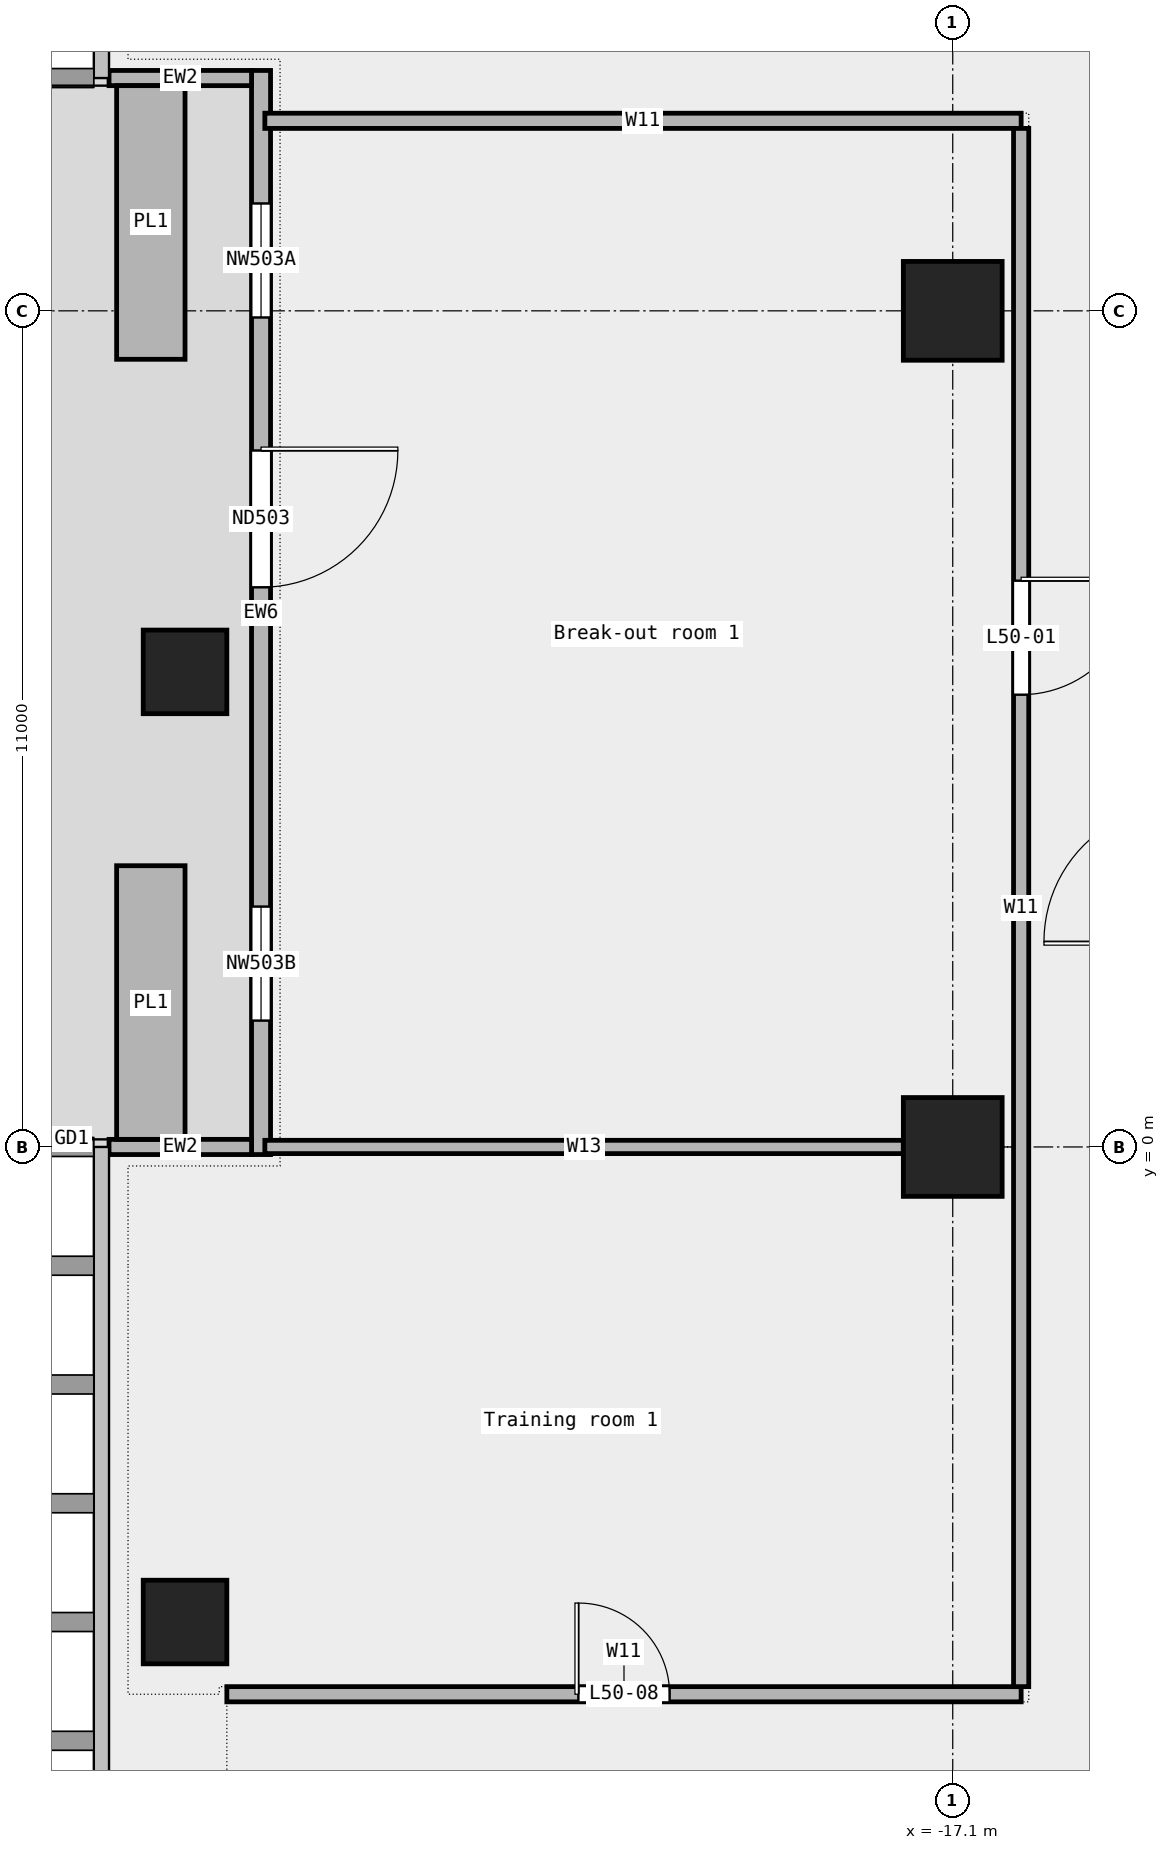
"""IFC4 building model, lengths in metres.
Left out: names, types, materials, properties, quantities, classifications, styles, units other than length and angle.
Written with IfcOpenShell. Run it as: python <this file> out.ifc"""

import sys

from ifc_helpers import new_model, si_unit, direction, frame, frame_2d, origin, origin_2d, place, context, subcontext, project, spatial, rectangle, extrude, element, fill, save


model = new_model("IFC4")
c1 = context("Model", 3, precision=1e-05, world=origin(), true_north=direction((0.0, 1.0)))
c2 = subcontext(c1, "Body", "Model", "MODEL_VIEW")
j1 = project(units=[si_unit("LENGTHUNIT", "METRE"), si_unit("PLANEANGLEUNIT", "RADIAN")], contexts=[c1])
p1 = place(None, origin())
s1 = spatial("IfcSite", under=j1, at=p1, CompositionType="ELEMENT")
p2 = place(p1, origin())
s2 = spatial("IfcBuilding", under=s1, at=p2, CompositionType="ELEMENT")
p3 = place(p2, frame((0.0, 0.0, 235.0)))
s3 = spatial("IfcBuildingStorey", under=s2, at=p3, CompositionType="ELEMENT", Elevation=235.0)
for number, where, z_axis, x_axis in (
    (1, (-27.2, 6.25, 0.0), (0.0, 0.0, 1.0), (1.0, 0.0, 0.0)),
    (2, (-27.2, -6.25, 0.0), (0.0, 0.0, 1.0), (1.0, 0.0, 0.0)),
):
    element("IfcColumn", number, at=place(p3, frame(where, z_axis=z_axis, x_axis=x_axis)), inside=s3, PredefinedType="COLUMN", context=c2, shape_type="SweptSolid", body=[
        extrude(rectangle(XDim=1.1, YDim=1.1, at=origin_2d()), origin(), (0.0, 0.0, 1.0), 3.6),
    ])
for number, where, z_axis, x_axis in (
    (3, (-17.1, 0.0, 0.0), (0.0, 0.0, 1.0), (1.0, 0.0, 0.0)),
    (4, (-17.1, 11.0, 0.0), (0.0, 0.0, 1.0), (1.0, 0.0, 0.0)),
):
    element("IfcColumn", number, at=place(p3, frame(where, z_axis=z_axis, x_axis=x_axis)), inside=s3, PredefinedType="COLUMN", context=c2, shape_type="SweptSolid", body=[
        extrude(rectangle(XDim=1.3, YDim=1.3, at=origin_2d()), origin(), (0.0, 0.0, 1.0), 3.6),
    ])
p4 = place(p3, frame((-26.2, 14.163, 0.0), z_axis=(0.0, 0.0, 1.0), x_axis=(0.0, -1.0, 0.0)))
e5 = element("IfcWall", 5, at=p4, inside=s3, PredefinedType="STANDARD", context=c2, shape_type="SweptSolid", body=[
    extrude(rectangle(XDim=14.263, YDim=0.25, at=frame_2d((7.131, 0.0))), origin(), (0.0, 0.0, 1.0), 3.6),
])
p5 = place(p4, frame((1.75, 0.0, 0.45)))
e6 = element("IfcOpeningElement", 6, at=p5, cuts=e5, PredefinedType="OPENING", context=c2, shape_type="SweptSolid", body=[
    extrude(rectangle(XDim=1.5, YDim=2.4, at=frame_2d((0.75, 1.2))), frame((0.0, 0.137, 0.0), z_axis=(0.0, -1.0, 0.0), x_axis=(1.0, 0.0, 0.0)), (0.0, 0.0, 1.0), 0.274),
])
p6 = place(p4, frame((5.0, 0.0, 0.0)))
e7 = element("IfcOpeningElement", 7, at=p6, cuts=e5, PredefinedType="OPENING", context=c2, shape_type="SweptSolid", body=[
    extrude(rectangle(XDim=1.8, YDim=2.4, at=frame_2d((0.9, 1.2))), frame((0.0, 0.137, 0.0), z_axis=(0.0, -1.0, 0.0), x_axis=(1.0, 0.0, 0.0)), (0.0, 0.0, 1.0), 0.274),
])
p7 = place(p4, frame((11.0, 0.0, 0.45)))
e8 = element("IfcOpeningElement", 8, at=p7, cuts=e5, PredefinedType="OPENING", context=c2, shape_type="SweptSolid", body=[
    extrude(rectangle(XDim=1.5, YDim=2.4, at=frame_2d((0.75, 1.2))), frame((0.0, 0.137, 0.0), z_axis=(0.0, -1.0, 0.0), x_axis=(1.0, 0.0, 0.0)), (0.0, 0.0, 1.0), 0.274),
])
for number, where, z_axis, x_axis in (
    (9, (-28.2, 14.062, 0.0), (0.0, 0.0, 1.0), (1.0, 0.0, 0.0)),
    (10, (-28.2, 0.0, 0.0), (0.0, 0.0, 1.0), (1.0, 0.0, 0.0)),
):
    element("IfcWall", number, at=place(p3, frame(where, z_axis=z_axis, x_axis=x_axis)), inside=s3, PredefinedType="STANDARD", context=c2, shape_type="SweptSolid", body=[
        extrude(rectangle(XDim=1.875, YDim=0.2, at=frame_2d((0.938, 0.0))), origin(), (0.0, 0.0, 1.0), 3.6),
    ])
for number, where, z_axis, x_axis in (
    (11, (-27.65, 13.962, 0.0), (0.0, 0.0, 1.0), (0.0, -1.0, 0.0)),
    (12, (-27.65, 3.7, 0.0), (0.0, 0.0, 1.0), (0.0, -1.0, 0.0)),
):
    element("IfcWall", number, at=place(p3, frame(where, z_axis=z_axis, x_axis=x_axis)), inside=s3, PredefinedType="STANDARD", context=c2, shape_type="SweptSolid", body=[
        extrude(rectangle(XDim=3.6, YDim=0.9, at=frame_2d((1.8, 0.0))), origin(), (0.0, 0.0, 1.0), 0.7),
    ])
p8 = place(p3, frame((-26.65, -7.2, 0.0), z_axis=(0.0, 0.0, 1.0), x_axis=(1.0, 0.0, 0.0)))
e13 = element("IfcWall", 13, at=p8, inside=s3, PredefinedType="PARTITIONING", context=c2, shape_type="SweptSolid", body=[
    extrude(rectangle(XDim=10.45, YDim=0.2, at=frame_2d((5.225, 0.0))), origin(), (0.0, 0.0, 1.0), 3.6),
])
p9 = place(p8, frame((4.625, 0.0, 0.0)))
e14 = element("IfcOpeningElement", 14, at=p9, cuts=e13, PredefinedType="OPENING", context=c2, shape_type="SweptSolid", body=[
    extrude(rectangle(XDim=1.2, YDim=2.1, at=frame_2d((0.6, 1.05))), frame((0.0, 0.112, 0.0), z_axis=(0.0, -1.0, 0.0), x_axis=(1.0, 0.0, 0.0)), (0.0, 0.0, 1.0), 0.224),
])
p10 = place(p3, frame((-26.15, 0.0, 0.0), z_axis=(0.0, 0.0, 1.0), x_axis=(1.0, 0.0, 0.0)))
e15 = element("IfcWall", 15, at=p10, inside=s3, PredefinedType="PARTITIONING", context=c2, shape_type="SweptSolid", body=[
    extrude(rectangle(XDim=8.4, YDim=0.175, at=frame_2d((4.2, 0.0))), origin(), (0.0, 0.0, 1.0), 3.6),
])
p11 = place(p3, frame((-26.15, 13.5, 0.0), z_axis=(0.0, 0.0, 1.0), x_axis=(1.0, 0.0, 0.0)))
e16 = element("IfcWall", 16, at=p11, inside=s3, PredefinedType="PARTITIONING", context=c2, shape_type="SweptSolid", body=[
    extrude(rectangle(XDim=9.95, YDim=0.2, at=frame_2d((4.975, 0.0))), origin(), (0.0, 0.0, 1.0), 3.6),
])
p12 = place(p3, frame((-16.2, -7.1, 0.0), z_axis=(0.0, 0.0, 1.0), x_axis=(0.0, 1.0, 0.0)))
e17 = element("IfcWall", 17, at=p12, inside=s3, PredefinedType="PARTITIONING", context=c2, shape_type="SweptSolid", body=[
    extrude(rectangle(XDim=20.5, YDim=0.2, at=frame_2d((10.25, 0.0))), origin(), (0.0, 0.0, 1.0), 3.6),
])
p13 = place(p12, frame((13.05, 0.0, 0.0)))
e18 = element("IfcOpeningElement", 18, at=p13, cuts=e17, PredefinedType="OPENING", context=c2, shape_type="SweptSolid", body=[
    extrude(rectangle(XDim=1.5, YDim=2.1, at=frame_2d((0.75, 1.05))), frame((0.0, 0.112, 0.0), z_axis=(0.0, -1.0, 0.0), x_axis=(1.0, 0.0, 0.0)), (0.0, 0.0, 1.0), 0.224),
])
p14 = place(p5, origin())
e19 = element("IfcWindow", 19, at=p14, inside=s3, PartitioningType="SINGLE_PANEL", PredefinedType="WINDOW", context=c2, shape_type="SweptSolid", body=[
    extrude(rectangle(XDim=1.5, YDim=2.4, at=frame_2d((0.75, 1.2))), frame((0.0, 0.03, 0.0), z_axis=(0.0, -1.0, 0.0), x_axis=(1.0, 0.0, 0.0)), (0.0, 0.0, 1.0), 0.06),
])
fill(e6, e19)
p15 = place(p6, origin())
e20 = element("IfcDoor", 20, at=p15, inside=s3, OperationType="DOUBLE_DOOR_SINGLE_SWING", PredefinedType="DOOR", context=c2, shape_type="SweptSolid", body=[
    extrude(rectangle(XDim=1.8, YDim=2.4, at=frame_2d((0.9, 1.2))), frame((0.0, 0.025, 0.0), z_axis=(0.0, -1.0, 0.0), x_axis=(1.0, 0.0, 0.0)), (0.0, 0.0, 1.0), 0.05),
])
fill(e7, e20)
p16 = place(p7, origin())
e21 = element("IfcWindow", 21, at=p16, inside=s3, PartitioningType="SINGLE_PANEL", PredefinedType="WINDOW", context=c2, shape_type="SweptSolid", body=[
    extrude(rectangle(XDim=1.5, YDim=2.4, at=frame_2d((0.75, 1.2))), frame((0.0, 0.03, 0.0), z_axis=(0.0, -1.0, 0.0), x_axis=(1.0, 0.0, 0.0)), (0.0, 0.0, 1.0), 0.06),
])
fill(e8, e21)
p17 = place(p13, origin())
e22 = element("IfcDoor", 22, at=p17, inside=s3, OperationType="DOUBLE_DOOR_SINGLE_SWING", PredefinedType="DOOR", context=c2, shape_type="SweptSolid", body=[
    extrude(rectangle(XDim=1.5, YDim=2.1, at=frame_2d((0.75, 1.05))), frame((0.0, 0.025, 0.0), z_axis=(0.0, -1.0, 0.0), x_axis=(1.0, 0.0, 0.0)), (0.0, 0.0, 1.0), 0.05),
])
fill(e18, e22)
p18 = place(p9, origin())
e23 = element("IfcDoor", 23, at=p18, inside=s3, OperationType="SINGLE_SWING_LEFT", PredefinedType="DOOR", context=c2, shape_type="SweptSolid", body=[
    extrude(rectangle(XDim=1.2, YDim=2.1, at=frame_2d((0.6, 1.05))), frame((0.0, 0.025, 0.0), z_axis=(0.0, -1.0, 0.0), x_axis=(1.0, 0.0, 0.0)), (0.0, 0.0, 1.0), 0.05),
])
fill(e14, e23)
save(model, sys.argv[1])
